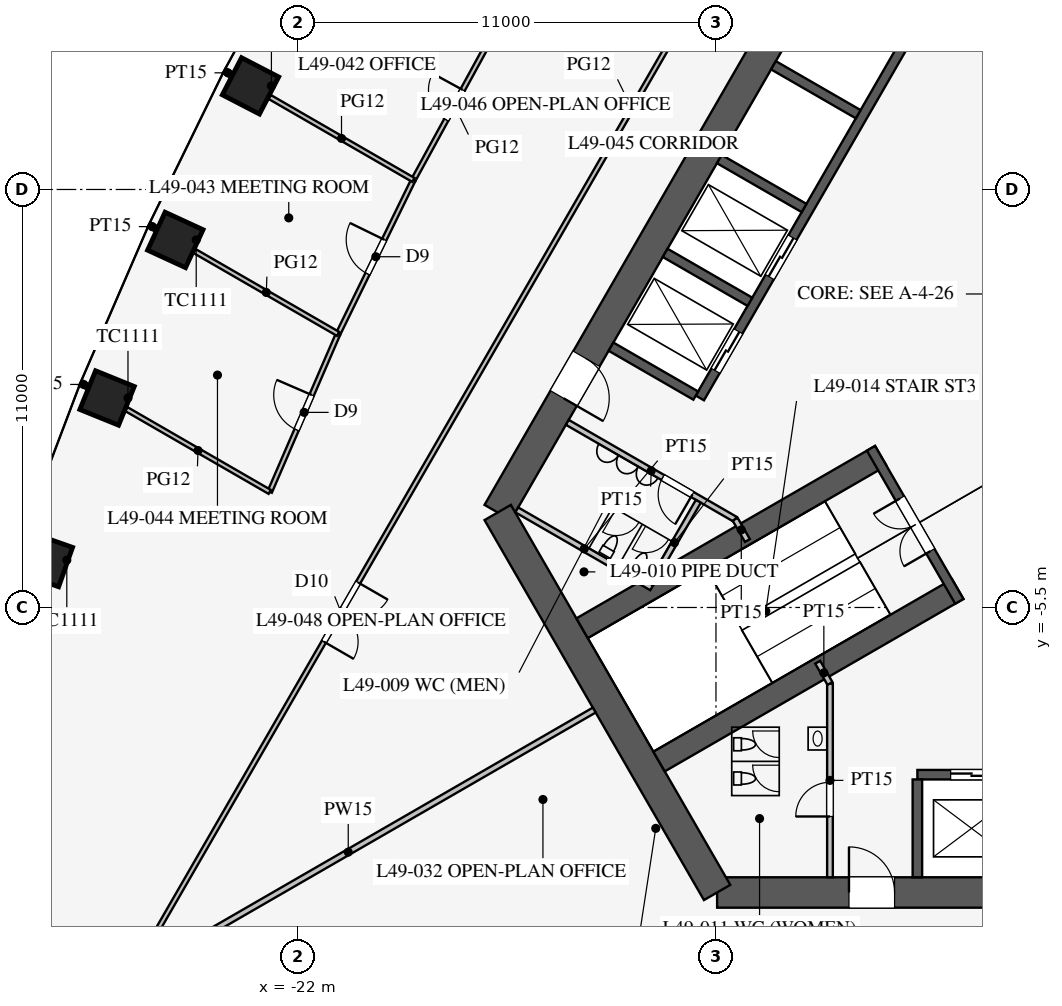
"""IFC4 building model, lengths in metres.
Left out: names, types, materials, properties, quantities, classifications, styles, units other than length and angle.
Written with IfcOpenShell. Run it as: python <this file> out.ifc"""

import sys

from ifc_helpers import new_model, si_unit, direction, frame, frame_2d, origin, origin_2d, place, context, subcontext, project, spatial, rectangle, extrude, element, fill, save


model = new_model("IFC4")
c1 = context("Model", 3, precision=1e-05, world=origin(), true_north=direction((0.0, 1.0)))
c2 = subcontext(c1, "Body", "Model", "MODEL_VIEW")
j1 = project(units=[si_unit("LENGTHUNIT", "METRE"), si_unit("PLANEANGLEUNIT", "RADIAN")], contexts=[c1])
p1 = place(None, origin())
s1 = spatial("IfcSite", under=j1, at=p1, CompositionType="ELEMENT")
p2 = place(p1, origin())
s2 = spatial("IfcBuilding", under=s1, at=p2, CompositionType="ELEMENT")
p3 = place(p2, frame((0.0, 0.0, 214.9)))
s3 = spatial("IfcBuildingStorey", under=s2, at=p3, CompositionType="ELEMENT", Elevation=214.9)
for number, where, z_axis, x_axis in (
    (1, (-23.248, 8.226, 0.0), (0.0, 0.0, 1.0), (-0.46, -0.888, 0.0)),
    (2, (-25.227, 4.172, 0.0), (0.0, 0.0, 1.0), (-0.418, -0.908, 0.0)),
    (3, (-27.022, 0.013, 0.0), (0.0, 0.0, 1.0), (-0.376, -0.927, 0.0)),
    (4, (-28.632, -4.254, 0.0), (0.0, 0.0, 1.0), (-0.332, -0.943, 0.0)),
):
    element("IfcColumn", number, at=place(p3, frame(where, z_axis=z_axis, x_axis=x_axis)), inside=s3, PredefinedType="COLUMN", context=c2, shape_type="SweptSolid", body=[
        extrude(rectangle(XDim=1.1, YDim=1.1, at=origin_2d()), origin(), (0.0, 0.0, 1.0), 4.2),
    ])
p4 = place(p3, frame((-10.97, -13.0, 0.0), z_axis=(0.0, 0.0, 1.0), x_axis=(1.0, 0.0, 0.0)))
e5 = element("IfcWall", 5, at=p4, inside=s3, PredefinedType="SHEAR", context=c2, shape_type="SweptSolid", body=[
    extrude(rectangle(XDim=21.939, YDim=0.8, at=frame_2d((10.97, 0.0))), origin(), (0.0, 0.0, 1.0), 4.2),
])
p5 = place(p4, frame((17.27, 0.0, 0.0)))
e6 = element("IfcOpeningElement", 6, at=p5, cuts=e5, PredefinedType="OPENING", context=c2, shape_type="SweptSolid", body=[
    extrude(rectangle(XDim=1.2, YDim=2.1, at=frame_2d((0.6, 1.05))), frame((0.0, 0.41, 0.0), z_axis=(0.0, -1.0, 0.0), x_axis=(1.0, 0.0, 0.0)), (0.0, 0.0, 1.0), 0.82),
])
p6 = place(p4, frame((3.47, 0.0, 0.0)))
e7 = element("IfcOpeningElement", 7, at=p6, cuts=e5, PredefinedType="OPENING", context=c2, shape_type="SweptSolid", body=[
    extrude(rectangle(XDim=1.2, YDim=2.1, at=frame_2d((0.6, 1.05))), frame((0.0, 0.41, 0.0), z_axis=(0.0, -1.0, 0.0), x_axis=(1.0, 0.0, 0.0)), (0.0, 0.0, 1.0), 0.82),
])
p7 = place(p3, frame((-5.773, 16.0, 0.0), z_axis=(0.0, 0.0, 1.0), x_axis=(-0.500002442456, -0.866023993627, 0.0)))
e8 = element("IfcWall", 8, at=p7, inside=s3, PredefinedType="SHEAR", context=c2, shape_type="SweptSolid", body=[
    extrude(rectangle(XDim=21.939, YDim=0.8, at=frame_2d((10.97, 0.0))), origin(), (0.0, 0.0, 1.0), 4.2),
])
p8 = place(p7, frame((17.27, 0.0, 0.0)))
e9 = element("IfcOpeningElement", 9, at=p8, cuts=e8, PredefinedType="OPENING", context=c2, shape_type="SweptSolid", body=[
    extrude(rectangle(XDim=1.2, YDim=2.1, at=frame_2d((0.6, 1.05))), frame((0.0, 0.41, 0.0), z_axis=(0.0, -1.0, 0.0), x_axis=(1.0, 0.0, 0.0)), (0.0, 0.0, 1.0), 0.82),
])
p9 = place(p7, frame((3.47, 0.0, 0.0)))
e10 = element("IfcOpeningElement", 10, at=p9, cuts=e8, PredefinedType="OPENING", context=c2, shape_type="SweptSolid", body=[
    extrude(rectangle(XDim=1.2, YDim=2.1, at=frame_2d((0.6, 1.05))), frame((0.0, 0.41, 0.0), z_axis=(0.0, -1.0, 0.0), x_axis=(1.0, 0.0, 0.0)), (0.0, 0.0, 1.0), 0.82),
])
p10 = place(p3, frame((-16.743, -3.0, 0.0), z_axis=(0.0, 0.0, 1.0), x_axis=(0.499995765644, -0.866027848477, 0.0)))
e11 = element("IfcWall", 11, at=p10, inside=s3, PredefinedType="SHEAR", context=c2, shape_type="SweptSolid", body=[
    extrude(rectangle(XDim=11.547, YDim=0.8, at=frame_2d((5.773, 0.0))), origin(), (0.0, 0.0, 1.0), 4.2),
])
p11 = place(p3, frame((-5.7, -9.9, 0.0), z_axis=(0.0, 0.0, 1.0), x_axis=(1.0, 0.0, 0.0)))
e12 = element("IfcWall", 12, at=p11, inside=s3, PredefinedType="SHEAR", context=c2, shape_type="SweptSolid", body=[
    extrude(rectangle(XDim=11.4, YDim=0.25, at=frame_2d((5.7, 0.0))), origin(), (0.0, 0.0, 1.0), 4.2),
])
p12 = place(p11, frame((0.875, 0.0, 0.0)))
e13 = element("IfcOpeningElement", 13, at=p12, cuts=e12, PredefinedType="OPENING", context=c2, shape_type="SweptSolid", body=[
    extrude(rectangle(XDim=1.1, YDim=2.2, at=frame_2d((0.55, 1.1))), frame((0.0, 0.135, 0.0), z_axis=(0.0, -1.0, 0.0), x_axis=(1.0, 0.0, 0.0)), (0.0, 0.0, 1.0), 0.27),
])
p13 = place(p11, frame((3.725, 0.0, 0.0)))
e14 = element("IfcOpeningElement", 14, at=p13, cuts=e12, PredefinedType="OPENING", context=c2, shape_type="SweptSolid", body=[
    extrude(rectangle(XDim=1.1, YDim=2.2, at=frame_2d((0.55, 1.1))), frame((0.0, 0.135, 0.0), z_axis=(0.0, -1.0, 0.0), x_axis=(1.0, 0.0, 0.0)), (0.0, 0.0, 1.0), 0.27),
])
p14 = place(p11, frame((6.575, 0.0, 0.0)))
e15 = element("IfcOpeningElement", 15, at=p14, cuts=e12, PredefinedType="OPENING", context=c2, shape_type="SweptSolid", body=[
    extrude(rectangle(XDim=1.1, YDim=2.2, at=frame_2d((0.55, 1.1))), frame((0.0, 0.135, 0.0), z_axis=(0.0, -1.0, 0.0), x_axis=(1.0, 0.0, 0.0)), (0.0, 0.0, 1.0), 0.27),
])
p15 = place(p11, frame((9.425, 0.0, 0.0)))
e16 = element("IfcOpeningElement", 16, at=p15, cuts=e12, PredefinedType="OPENING", context=c2, shape_type="SweptSolid", body=[
    extrude(rectangle(XDim=1.1, YDim=2.2, at=frame_2d((0.55, 1.1))), frame((0.0, 0.135, 0.0), z_axis=(0.0, -1.0, 0.0), x_axis=(1.0, 0.0, 0.0)), (0.0, 0.0, 1.0), 0.27),
])
p16 = place(p3, frame((-5.7, -10.025, 0.0), z_axis=(0.0, 0.0, 1.0), x_axis=(0.0, -1.0, 0.0)))
e17 = element("IfcWall", 17, at=p16, inside=s3, PredefinedType="SHEAR", context=c2, shape_type="SweptSolid", body=[
    extrude(rectangle(XDim=2.575, YDim=0.25, at=frame_2d((1.288, 0.0))), origin(), (0.0, 0.0, 1.0), 4.2),
])
p17 = place(p3, frame((-5.724, 9.886, 0.0), z_axis=(0.0, 0.0, 1.0), x_axis=(-0.500001763848, -0.866024385424, 0.0)))
e18 = element("IfcWall", 18, at=p17, inside=s3, PredefinedType="SHEAR", context=c2, shape_type="SweptSolid", body=[
    extrude(rectangle(XDim=11.4, YDim=0.25, at=frame_2d((5.7, 0.0))), origin(), (0.0, 0.0, 1.0), 4.2),
])
p18 = place(p17, frame((6.525, 0.0, 0.0)))
e19 = element("IfcOpeningElement", 19, at=p18, cuts=e18, PredefinedType="OPENING", context=c2, shape_type="SweptSolid", body=[
    extrude(rectangle(XDim=1.2, YDim=2.2, at=frame_2d((0.6, 1.1))), frame((0.0, 0.135, 0.0), z_axis=(0.0, -1.0, 0.0), x_axis=(1.0, 0.0, 0.0)), (0.0, 0.0, 1.0), 0.27),
])
p19 = place(p17, frame((9.375, 0.0, 0.0)))
e20 = element("IfcOpeningElement", 20, at=p19, cuts=e18, PredefinedType="OPENING", context=c2, shape_type="SweptSolid", body=[
    extrude(rectangle(XDim=1.2, YDim=2.2, at=frame_2d((0.6, 1.1))), frame((0.0, 0.135, 0.0), z_axis=(0.0, -1.0, 0.0), x_axis=(1.0, 0.0, 0.0)), (0.0, 0.0, 1.0), 0.27),
])
for number, where, z_axis, x_axis in (
    (21, (-7.257, 7.481, 0.0), (0.0, 0.0, 1.0), (-0.866, 0.5, 0.0)),
    (22, (-8.682, 5.012, 0.0), (0.0, 0.0, 1.0), (-0.866, 0.5, 0.0)),
    (23, (-10.107, 2.544, 0.0), (0.0, 0.0, 1.0), (-0.866, 0.5, 0.0)),
    (24, (-11.532, 0.076, 0.0), (0.0, 0.0, 1.0), (-0.866, 0.5, 0.0)),
):
    element("IfcWall", number, at=place(p3, frame(where, z_axis=z_axis, x_axis=x_axis)), inside=s3, PredefinedType="SHEAR", context=c2, shape_type="SweptSolid", body=[
        extrude(rectangle(XDim=2.575, YDim=0.25, at=frame_2d((1.288, 0.0))), origin(), (0.0, 0.0, 1.0), 4.2),
    ])
for number, where, z_axis, x_axis in (
    (25, (-6.663, -1.509, 0.0), (0.0, 0.0, 1.0), (-0.866, -0.5, 0.0)),
    (26, (-4.638, -5.016, 0.0), (0.0, 0.0, 1.0), (-0.866, -0.5, 0.0)),
):
    element("IfcWall", number, at=place(p3, frame(where, z_axis=z_axis, x_axis=x_axis)), inside=s3, PredefinedType="SHEAR", context=c2, shape_type="SweptSolid", body=[
        extrude(rectangle(XDim=9.075, YDim=0.6, at=frame_2d((4.538, 0.0))), origin(), (0.0, 0.0, 1.0), 4.2),
    ])
p20 = place(p3, frame((-6.922, -1.312, 0.0), z_axis=(0.0, 0.0, 1.0), x_axis=(0.499984536904, -0.866034331223, 0.0)))
e27 = element("IfcWall", 27, at=p20, inside=s3, PredefinedType="SHEAR", context=c2, shape_type="SweptSolid", body=[
    extrude(rectangle(XDim=4.65, YDim=0.25, at=frame_2d((2.325, 0.0))), origin(), (0.0, 0.0, 1.0), 4.2),
])
p21 = place(p20, frame((1.525, 0.0, 0.0)))
e28 = element("IfcOpeningElement", 28, at=p21, cuts=e27, PredefinedType="OPENING", context=c2, shape_type="SweptSolid", body=[
    extrude(rectangle(XDim=1.6, YDim=2.1, at=frame_2d((0.8, 1.05))), frame((0.0, 0.135, 0.0), z_axis=(0.0, -1.0, 0.0), x_axis=(1.0, 0.0, 0.0)), (0.0, 0.0, 1.0), 0.27),
])
p22 = place(p3, frame((-8.0, -7.5, 0.0), z_axis=(0.0, 0.0, 1.0), x_axis=(0.0, -1.0, 0.0)))
e29 = element("IfcWall", 29, at=p22, inside=s3, PredefinedType="PARTITIONING", context=c2, shape_type="SweptSolid", body=[
    extrude(rectangle(XDim=5.1, YDim=0.15, at=frame_2d((2.55, 0.0))), origin(), (0.0, 0.0, 1.0), 4.0),
])
p23 = place(p22, frame((2.6, 0.0, 0.0)))
e30 = element("IfcOpeningElement", 30, at=p23, cuts=e29, PredefinedType="OPENING", context=c2, shape_type="SweptSolid", body=[
    extrude(rectangle(XDim=0.9, YDim=2.1, at=frame_2d((0.45, 1.05))), frame((0.0, 0.085, 0.0), z_axis=(0.0, -1.0, 0.0), x_axis=(1.0, 0.0, 0.0)), (0.0, 0.0, 1.0), 0.17),
])
p24 = place(p3, frame((-10.495, -3.178, 0.0), z_axis=(0.0, 0.0, 1.0), x_axis=(-0.86602216432, 0.500005610874, 0.0)))
e31 = element("IfcWall", 31, at=p24, inside=s3, PredefinedType="PARTITIONING", context=c2, shape_type="SweptSolid", body=[
    extrude(rectangle(XDim=5.1, YDim=0.15, at=frame_2d((2.55, 0.0))), origin(), (0.0, 0.0, 1.0), 4.0),
])
p25 = place(p24, frame((1.3, 0.0, 0.0)))
e32 = element("IfcOpeningElement", 32, at=p25, cuts=e31, PredefinedType="OPENING", context=c2, shape_type="SweptSolid", body=[
    extrude(rectangle(XDim=0.9, YDim=2.1, at=frame_2d((0.45, 1.05))), frame((0.0, 0.085, 0.0), z_axis=(0.0, -1.0, 0.0), x_axis=(1.0, 0.0, 0.0)), (0.0, 0.0, 1.0), 0.17),
])
for number, where, z_axis, x_axis in (
    (33, (-10.495, -3.178, 0.0), (0.0, 0.0, 1.0), (0.5, -0.866, 0.0)),
    (34, (-8.0, -7.5, 0.0), (0.0, 0.0, 1.0), (-0.5, 0.866, 0.0)),
):
    element("IfcWall", number, at=place(p3, frame(where, z_axis=z_axis, x_axis=x_axis)), inside=s3, PredefinedType="PARTITIONING", context=c2, shape_type="SweptSolid", body=[
        extrude(rectangle(XDim=0.645, YDim=0.15, at=frame_2d((0.323, 0.0))), origin(), (0.0, 0.0, 1.0), 4.0),
    ])
p26 = place(p3, frame((-12.691, -4.982, 0.0), z_axis=(0.0, 0.0, 1.0), x_axis=(-0.8660249478, 0.500000789788, 0.0)))
e35 = element("IfcWall", 35, at=p26, inside=s3, PredefinedType="PARTITIONING", context=c2, shape_type="SweptSolid", body=[
    extrude(rectangle(XDim=4.1, YDim=0.15, at=frame_2d((2.05, 0.0))), origin(), (0.0, 0.0, 1.0), 4.0),
])
p27 = place(p3, frame((-11.464, -2.706, 0.0), z_axis=(0.0, 0.0, 1.0), x_axis=(-0.50001992892, -0.866013897511, 0.0)))
e36 = element("IfcWall", 36, at=p27, inside=s3, PredefinedType="PARTITIONING", context=c2, shape_type="SweptSolid", body=[
    extrude(rectangle(XDim=2.51, YDim=0.15, at=frame_2d((1.255, 0.0))), origin(), (0.0, 0.0, 1.0), 4.0),
])
p28 = place(p3, frame((-14.203, -8.2, 0.0), z_axis=(0.0, 0.0, 1.0), x_axis=(-0.866021600284, -0.500006587798, 0.0)))
e37 = element("IfcWall", 37, at=p28, inside=s3, PredefinedType="PARTITIONING", context=c2, shape_type="SweptSolid", body=[
    extrude(rectangle(XDim=14.95, YDim=0.15, at=frame_2d((7.475, 0.0))), origin(), (0.0, 0.0, 1.0), 2.4),
])
p29 = place(p3, frame((-0.016, 30.491, 0.0), z_axis=(0.0, 0.0, 1.0), x_axis=(-0.50000091641, -0.866024874695, 0.0)))
e38 = element("IfcWall", 38, at=p29, inside=s3, PredefinedType="PARTITIONING", context=c2, shape_type="SweptSolid", body=[
    extrude(rectangle(XDim=52.796, YDim=0.12, at=frame_2d((26.398, 0.0))), origin(), (0.0, 0.0, 1.0), 2.9),
])
p30 = place(p29, frame((10.2, 0.0, 0.15)))
e39 = element("IfcOpeningElement", 39, at=p30, cuts=e38, PredefinedType="OPENING", context=c2, shape_type="SweptSolid", body=[
    extrude(rectangle(XDim=1.8, YDim=2.1, at=frame_2d((0.9, 1.05))), frame((0.0, 0.07, 0.0), z_axis=(0.0, -1.0, 0.0), x_axis=(1.0, 0.0, 0.0)), (0.0, 0.0, 1.0), 0.14),
])
p31 = place(p29, frame((40.8, 0.0, 0.15)))
e40 = element("IfcOpeningElement", 40, at=p31, cuts=e38, PredefinedType="OPENING", context=c2, shape_type="SweptSolid", body=[
    extrude(rectangle(XDim=1.8, YDim=2.1, at=frame_2d((0.9, 1.05))), frame((0.0, 0.07, 0.0), z_axis=(0.0, -1.0, 0.0), x_axis=(1.0, 0.0, 0.0)), (0.0, 0.0, 1.0), 0.14),
])
p32 = place(p3, frame((-27.563, 0.325, 0.0), z_axis=(0.0, 0.0, 1.0), x_axis=(-0.865614066289, 0.500711781609, 0.0)))
e41 = element("IfcWall", 41, at=p32, inside=s3, PredefinedType="PARTITIONING", context=c2, shape_type="SweptSolid", body=[
    extrude(rectangle(XDim=0.178, YDim=0.15, at=frame_2d((0.089, 0.0))), origin(), (0.0, 0.0, 1.0), 2.9),
])
p33 = place(p3, frame((-23.749, 8.515, 0.0), z_axis=(0.0, 0.0, 1.0), x_axis=(-0.865810949009, 0.500371262739, 0.0)))
e42 = element("IfcWall", 42, at=p33, inside=s3, PredefinedType="PARTITIONING", context=c2, shape_type="SweptSolid", body=[
    extrude(rectangle(XDim=0.217, YDim=0.15, at=frame_2d((0.108, 0.0))), origin(), (0.0, 0.0, 1.0), 2.9),
])
p34 = place(p3, frame((-25.748, 4.473, 0.0), z_axis=(0.0, 0.0, 1.0), x_axis=(-0.865625187776, 0.500692554656, 0.0)))
e43 = element("IfcWall", 43, at=p34, inside=s3, PredefinedType="PARTITIONING", context=c2, shape_type="SweptSolid", body=[
    extrude(rectangle(XDim=0.196, YDim=0.15, at=frame_2d((0.098, 0.0))), origin(), (0.0, 0.0, 1.0), 2.9),
])
p35 = place(p3, frame((-16.802, 9.7, 0.0), z_axis=(0.0, 0.0, 1.0), x_axis=(-0.479949984371, -0.877295852322, 0.0)))
e44 = element("IfcWall", 44, at=p35, inside=s3, PredefinedType="PARTITIONING", context=c2, shape_type="SweptSolid", body=[
    extrude(rectangle(XDim=4.501, YDim=0.12, at=frame_2d((2.25, 0.0))), origin(), (0.0, 0.0, 1.0), 2.9),
])
p36 = place(p35, frame((1.8, 0.0, 0.15)))
e45 = element("IfcOpeningElement", 45, at=p36, cuts=e44, PredefinedType="OPENING", context=c2, shape_type="SweptSolid", body=[
    extrude(rectangle(XDim=0.9, YDim=2.1, at=frame_2d((0.45, 1.05))), frame((0.0, 0.07, 0.0), z_axis=(0.0, -1.0, 0.0), x_axis=(1.0, 0.0, 0.0)), (0.0, 0.0, 1.0), 0.14),
])
p37 = place(p3, frame((-18.962, 5.751, 0.0), z_axis=(0.0, 0.0, 1.0), x_axis=(-0.43911984878, -0.898428493764, 0.0)))
e46 = element("IfcWall", 46, at=p37, inside=s3, PredefinedType="PARTITIONING", context=c2, shape_type="SweptSolid", body=[
    extrude(rectangle(XDim=4.511, YDim=0.12, at=frame_2d((2.255, 0.0))), origin(), (0.0, 0.0, 1.0), 2.9),
])
p38 = place(p37, frame((1.75, 0.0, 0.15)))
e47 = element("IfcOpeningElement", 47, at=p38, cuts=e46, PredefinedType="OPENING", context=c2, shape_type="SweptSolid", body=[
    extrude(rectangle(XDim=1.0, YDim=2.1, at=frame_2d((0.5, 1.05))), frame((0.0, 0.07, 0.0), z_axis=(0.0, -1.0, 0.0), x_axis=(1.0, 0.0, 0.0)), (0.0, 0.0, 1.0), 0.14),
])
p39 = place(p3, frame((-20.943, 1.699, 0.0), z_axis=(0.0, 0.0, 1.0), x_axis=(-0.397253491631, -0.917708920839, 0.0)))
e48 = element("IfcWall", 48, at=p39, inside=s3, PredefinedType="PARTITIONING", context=c2, shape_type="SweptSolid", body=[
    extrude(rectangle(XDim=4.53, YDim=0.12, at=frame_2d((2.265, 0.0))), origin(), (0.0, 0.0, 1.0), 2.9),
])
p40 = place(p39, frame((1.75, 0.0, 0.15)))
e49 = element("IfcOpeningElement", 49, at=p40, cuts=e48, PredefinedType="OPENING", context=c2, shape_type="SweptSolid", body=[
    extrude(rectangle(XDim=1.0, YDim=2.1, at=frame_2d((0.5, 1.05))), frame((0.0, 0.07, 0.0), z_axis=(0.0, -1.0, 0.0), x_axis=(1.0, 0.0, 0.0)), (0.0, 0.0, 1.0), 0.14),
])
p41 = place(p3, frame((-22.742, -2.458, 0.0), z_axis=(0.0, 0.0, 1.0), x_axis=(-0.866034407719, 0.499984404404, 0.0)))
e50 = element("IfcWall", 50, at=p41, inside=s3, PredefinedType="PARTITIONING", context=c2, shape_type="SweptSolid", body=[
    extrude(rectangle(XDim=4.357, YDim=0.12, at=frame_2d((2.178, 0.0))), origin(), (0.0, 0.0, 1.0), 2.9),
])
p42 = place(p3, frame((-18.962, 5.751, 0.0), z_axis=(0.0, 0.0, 1.0), x_axis=(-0.866016202281, 0.500015937133, 0.0)))
e51 = element("IfcWall", 51, at=p42, inside=s3, PredefinedType="PARTITIONING", context=c2, shape_type="SweptSolid", body=[
    extrude(rectangle(XDim=4.368, YDim=0.12, at=frame_2d((2.184, 0.0))), origin(), (0.0, 0.0, 1.0), 2.9),
])
p43 = place(p3, frame((-20.943, 1.699, 0.0), z_axis=(0.0, 0.0, 1.0), x_axis=(-0.866024423162, 0.500001698484, 0.0)))
e52 = element("IfcWall", 52, at=p43, inside=s3, PredefinedType="PARTITIONING", context=c2, shape_type="SweptSolid", body=[
    extrude(rectangle(XDim=4.364, YDim=0.12, at=frame_2d((2.182, 0.0))), origin(), (0.0, 0.0, 1.0), 2.9),
])
p44 = place(p23, frame((0.9, 0.0, 0.0), z_axis=(0.0, 0.0, 1.0), x_axis=(-1.0, 0.0, 0.0)))
e53 = element("IfcDoor", 53, at=p44, inside=s3, OperationType="SINGLE_SWING_LEFT", PredefinedType="DOOR", context=c2, shape_type="SweptSolid", body=[
    extrude(rectangle(XDim=0.9, YDim=2.1, at=frame_2d((0.45, 1.05))), frame((0.0, 0.025, 0.0), z_axis=(0.0, -1.0, 0.0), x_axis=(1.0, 0.0, 0.0)), (0.0, 0.0, 1.0), 0.05),
])
fill(e30, e53)
p45 = place(p25, origin())
e54 = element("IfcDoor", 54, at=p45, inside=s3, OperationType="SINGLE_SWING_LEFT", PredefinedType="DOOR", context=c2, shape_type="SweptSolid", body=[
    extrude(rectangle(XDim=0.9, YDim=2.1, at=frame_2d((0.45, 1.05))), frame((0.0, 0.025, 0.0), z_axis=(0.0, -1.0, 0.0), x_axis=(1.0, 0.0, 0.0)), (0.0, 0.0, 1.0), 0.05),
])
fill(e32, e54)
p46 = place(p21, frame((1.6, 0.0, 0.0), z_axis=(0.0, 0.0, 1.0), x_axis=(-1.0, 0.0, 0.0)))
e55 = element("IfcDoor", 55, at=p46, inside=s3, OperationType="DOUBLE_DOOR_SINGLE_SWING", PredefinedType="DOOR", context=c2, shape_type="SweptSolid", body=[
    extrude(rectangle(XDim=1.6, YDim=2.1, at=frame_2d((0.8, 1.05))), frame((0.0, 0.025, 0.0), z_axis=(0.0, -1.0, 0.0), x_axis=(1.0, 0.0, 0.0)), (0.0, 0.0, 1.0), 0.05),
])
fill(e28, e55)
p47 = place(p6, origin())
e56 = element("IfcDoor", 56, at=p47, inside=s3, OperationType="SINGLE_SWING_LEFT", PredefinedType="DOOR", context=c2, shape_type="SweptSolid", body=[
    extrude(rectangle(XDim=1.2, YDim=2.1, at=frame_2d((0.6, 1.05))), frame((0.0, 0.025, 0.0), z_axis=(0.0, -1.0, 0.0), x_axis=(1.0, 0.0, 0.0)), (0.0, 0.0, 1.0), 0.05),
])
fill(e7, e56)
p48 = place(p8, origin())
e57 = element("IfcDoor", 57, at=p48, inside=s3, OperationType="SINGLE_SWING_RIGHT", PredefinedType="DOOR", context=c2, shape_type="SweptSolid", body=[
    extrude(rectangle(XDim=1.2, YDim=2.1, at=frame_2d((0.6, 1.05))), frame((0.0, 0.025, 0.0), z_axis=(0.0, -1.0, 0.0), x_axis=(1.0, 0.0, 0.0)), (0.0, 0.0, 1.0), 0.05),
])
fill(e9, e57)
p49 = place(p36, frame((0.9, 0.0, 0.0), z_axis=(0.0, 0.0, 1.0), x_axis=(-1.0, 0.0, 0.0)))
e58 = element("IfcDoor", 58, at=p49, inside=s3, OperationType="SINGLE_SWING_RIGHT", PredefinedType="DOOR", context=c2, shape_type="SweptSolid", body=[
    extrude(rectangle(XDim=0.9, YDim=2.1, at=frame_2d((0.45, 1.05))), frame((0.0, 0.025, 0.0), z_axis=(0.0, -1.0, 0.0), x_axis=(1.0, 0.0, 0.0)), (0.0, 0.0, 1.0), 0.05),
])
fill(e45, e58)
p50 = place(p38, frame((1.0, 0.0, 0.0), z_axis=(0.0, 0.0, 1.0), x_axis=(-1.0, 0.0, 0.0)))
e59 = element("IfcDoor", 59, at=p50, inside=s3, OperationType="SINGLE_SWING_RIGHT", PredefinedType="DOOR", context=c2, shape_type="SweptSolid", body=[
    extrude(rectangle(XDim=1.0, YDim=2.1, at=frame_2d((0.5, 1.05))), frame((0.0, 0.025, 0.0), z_axis=(0.0, -1.0, 0.0), x_axis=(1.0, 0.0, 0.0)), (0.0, 0.0, 1.0), 0.05),
])
fill(e47, e59)
p51 = place(p40, frame((1.0, 0.0, 0.0), z_axis=(0.0, 0.0, 1.0), x_axis=(-1.0, 0.0, 0.0)))
e60 = element("IfcDoor", 60, at=p51, inside=s3, OperationType="SINGLE_SWING_RIGHT", PredefinedType="DOOR", context=c2, shape_type="SweptSolid", body=[
    extrude(rectangle(XDim=1.0, YDim=2.1, at=frame_2d((0.5, 1.05))), frame((0.0, 0.025, 0.0), z_axis=(0.0, -1.0, 0.0), x_axis=(1.0, 0.0, 0.0)), (0.0, 0.0, 1.0), 0.05),
])
fill(e49, e60)
p52 = place(p31, origin())
e61 = element("IfcDoor", 61, at=p52, inside=s3, OperationType="DOUBLE_DOOR_SINGLE_SWING", PredefinedType="DOOR", context=c2, shape_type="SweptSolid", body=[
    extrude(rectangle(XDim=1.8, YDim=2.1, at=frame_2d((0.9, 1.05))), frame((0.0, 0.025, 0.0), z_axis=(0.0, -1.0, 0.0), x_axis=(1.0, 0.0, 0.0)), (0.0, 0.0, 1.0), 0.05),
])
fill(e40, e61)
p53 = place(p12, origin())
e62 = element("IfcDoor", 62, at=p53, inside=s3, OperationType="DOUBLE_DOOR_SLIDING", PredefinedType="DOOR", context=c2, shape_type="SweptSolid", body=[
    extrude(rectangle(XDim=1.1, YDim=2.2, at=frame_2d((0.55, 1.1))), frame((0.0, 0.025, 0.0), z_axis=(0.0, -1.0, 0.0), x_axis=(1.0, 0.0, 0.0)), (0.0, 0.0, 1.0), 0.05),
])
fill(e13, e62)
p54 = place(p18, origin())
e63 = element("IfcDoor", 63, at=p54, inside=s3, OperationType="DOUBLE_DOOR_SLIDING", PredefinedType="DOOR", context=c2, shape_type="SweptSolid", body=[
    extrude(rectangle(XDim=1.2, YDim=2.2, at=frame_2d((0.6, 1.1))), frame((0.0, 0.025, 0.0), z_axis=(0.0, -1.0, 0.0), x_axis=(1.0, 0.0, 0.0)), (0.0, 0.0, 1.0), 0.05),
])
fill(e19, e63)
p55 = place(p19, origin())
e64 = element("IfcDoor", 64, at=p55, inside=s3, OperationType="DOUBLE_DOOR_SLIDING", PredefinedType="DOOR", context=c2, shape_type="SweptSolid", body=[
    extrude(rectangle(XDim=1.2, YDim=2.2, at=frame_2d((0.6, 1.1))), frame((0.0, 0.025, 0.0), z_axis=(0.0, -1.0, 0.0), x_axis=(1.0, 0.0, 0.0)), (0.0, 0.0, 1.0), 0.05),
])
fill(e20, e64)
save(model, sys.argv[1])
